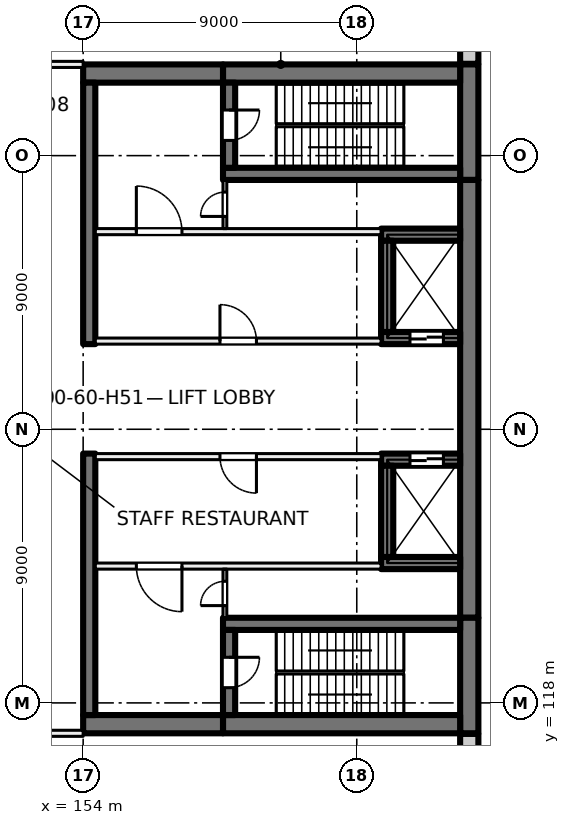
"""IFC4 building model, lengths in metres.
Left out: names, types, materials, properties, quantities, classifications, styles, units other than length and angle.
Written with IfcOpenShell. Run it as: python <this file> out.ifc"""

import sys

from ifc_helpers import new_model, si_unit, direction, frame, frame_2d, origin, place, context, subcontext, project, spatial, rectangle, extrude, element, fill, save


model = new_model("IFC4")
c1 = context("Model", 3, precision=1e-05, world=origin(), true_north=direction((0.0, 1.0)))
c2 = subcontext(c1, "Body", "Model", "MODEL_VIEW")
j1 = project(units=[si_unit("LENGTHUNIT", "METRE"), si_unit("PLANEANGLEUNIT", "RADIAN")], contexts=[c1])
p1 = place(None, origin())
s1 = spatial("IfcSite", under=j1, at=p1, CompositionType="ELEMENT")
p2 = place(p1, origin())
s2 = spatial("IfcBuilding", under=s1, at=p2, CompositionType="ELEMENT")
p3 = place(p2, frame((0.0, 0.0, 75.5)))
s3 = spatial("IfcBuildingStorey", under=s2, at=p3, CompositionType="ELEMENT", Elevation=75.5)
p4 = place(p3, frame((166.7, 139.0, 0.0), z_axis=(0.0, 0.0, 1.0), x_axis=(0.0, -1.0, 0.0)))
e1 = element("IfcWall", 1, at=p4, inside=s3, PredefinedType="SHEAR", context=c2, shape_type="SweptSolid", body=[
    extrude(rectangle(XDim=3.8, YDim=0.6, at=frame_2d((1.9, 0.0))), origin(), (0.0, 0.0, 1.0), 5.5),
])
p5 = place(p3, frame((166.7, 135.2, 0.0), z_axis=(0.0, 0.0, 1.0), x_axis=(0.0, -1.0, 0.0)))
e2 = element("IfcWall", 2, at=p5, inside=s3, PredefinedType="SHEAR", context=c2, shape_type="SweptSolid", body=[
    extrude(rectangle(XDim=14.4, YDim=0.6, at=frame_2d((7.2, 0.0))), origin(), (0.0, 0.0, 1.0), 5.5),
])
p6 = place(p3, frame((166.7, 120.8, 0.0), z_axis=(0.0, 0.0, 1.0), x_axis=(0.0, -1.0, 0.0)))
e3 = element("IfcWall", 3, at=p6, inside=s3, PredefinedType="SHEAR", context=c2, shape_type="SweptSolid", body=[
    extrude(rectangle(XDim=3.8, YDim=0.6, at=frame_2d((1.9, 0.0))), origin(), (0.0, 0.0, 1.0), 5.5),
])
for number, where, z_axis, x_axis in (
    (4, (166.4, 138.7, 0.0), (0.0, 0.0, 1.0), (-1.0, 0.0, 0.0)),
    (5, (166.4, 117.3, 0.0), (0.0, 0.0, 1.0), (-1.0, 0.0, 0.0)),
):
    element("IfcWall", number, at=place(p3, frame(where, z_axis=z_axis, x_axis=x_axis)), inside=s3, PredefinedType="SHEAR", context=c2, shape_type="SweptSolid", body=[
        extrude(rectangle(XDim=7.8, YDim=0.6, at=frame_2d((3.9, 0.0))), origin(), (0.0, 0.0, 1.0), 5.5),
    ])
for number, where, z_axis, x_axis in (
    (6, (158.6, 138.7, 0.0), (0.0, 0.0, 1.0), (-1.0, 0.0, 0.0)),
    (7, (158.6, 117.3, 0.0), (0.0, 0.0, 1.0), (-1.0, 0.0, 0.0)),
):
    element("IfcWall", number, at=place(p3, frame(where, z_axis=z_axis, x_axis=x_axis)), inside=s3, PredefinedType="SHEAR", context=c2, shape_type="SweptSolid", body=[
        extrude(rectangle(XDim=4.6, YDim=0.6, at=frame_2d((2.3, 0.0))), origin(), (0.0, 0.0, 1.0), 5.5),
    ])
p7 = place(p3, frame((166.4, 135.4, 0.0), z_axis=(0.0, 0.0, 1.0), x_axis=(-1.0, 0.0, 0.0)))
e8 = element("IfcWall", 8, at=p7, inside=s3, PredefinedType="SHEAR", context=c2, shape_type="SweptSolid", body=[
    extrude(rectangle(XDim=7.8, YDim=0.4, at=frame_2d((3.9, 0.0))), origin(), (0.0, 0.0, 1.0), 5.5),
])
p8 = place(p3, frame((158.8, 138.4, 0.0), z_axis=(0.0, 0.0, 1.0), x_axis=(0.0, -1.0, 0.0)))
e9 = element("IfcWall", 9, at=p8, inside=s3, PredefinedType="SHEAR", context=c2, shape_type="SweptSolid", body=[
    extrude(rectangle(XDim=2.8, YDim=0.4, at=frame_2d((1.4, 0.0))), origin(), (0.0, 0.0, 1.0), 5.5),
])
p9 = place(p8, frame((0.9, 0.0, 0.0)))
e10 = element("IfcOpeningElement", 10, at=p9, cuts=e9, PredefinedType="OPENING", context=c2, shape_type="SweptSolid", body=[
    extrude(rectangle(XDim=1.0, YDim=2.1, at=frame_2d((0.5, 1.05))), frame((0.0, 0.21, 0.0), z_axis=(0.0, -1.0, 0.0), x_axis=(1.0, 0.0, 0.0)), (0.0, 0.0, 1.0), 0.42),
])
p10 = place(p3, frame((166.4, 120.6, 0.0), z_axis=(0.0, 0.0, 1.0), x_axis=(-1.0, 0.0, 0.0)))
e11 = element("IfcWall", 11, at=p10, inside=s3, PredefinedType="SHEAR", context=c2, shape_type="SweptSolid", body=[
    extrude(rectangle(XDim=7.8, YDim=0.4, at=frame_2d((3.9, 0.0))), origin(), (0.0, 0.0, 1.0), 5.5),
])
p11 = place(p3, frame((158.8, 120.4, 0.0), z_axis=(0.0, 0.0, 1.0), x_axis=(0.0, -1.0, 0.0)))
e12 = element("IfcWall", 12, at=p11, inside=s3, PredefinedType="SHEAR", context=c2, shape_type="SweptSolid", body=[
    extrude(rectangle(XDim=2.8, YDim=0.4, at=frame_2d((1.4, 0.0))), origin(), (0.0, 0.0, 1.0), 5.5),
])
p12 = place(p11, frame((0.9, 0.0, 0.0)))
e13 = element("IfcOpeningElement", 13, at=p12, cuts=e12, PredefinedType="OPENING", context=c2, shape_type="SweptSolid", body=[
    extrude(rectangle(XDim=1.0, YDim=2.1, at=frame_2d((0.5, 1.05))), frame((0.0, 0.21, 0.0), z_axis=(0.0, -1.0, 0.0), x_axis=(1.0, 0.0, 0.0)), (0.0, 0.0, 1.0), 0.42),
])
p13 = place(p3, frame((166.4, 130.0, 0.0), z_axis=(0.0, 0.0, 1.0), x_axis=(-1.0, 0.0, 0.0)))
e14 = element("IfcWall", 14, at=p13, inside=s3, PredefinedType="SHEAR", context=c2, shape_type="SweptSolid", body=[
    extrude(rectangle(XDim=2.6, YDim=0.4, at=frame_2d((1.3, 0.0))), origin(), (0.0, 0.0, 1.0), 5.5),
])
p14 = place(p13, frame((0.55, 0.0, 0.0)))
e15 = element("IfcOpeningElement", 15, at=p14, cuts=e14, PredefinedType="OPENING", context=c2, shape_type="SweptSolid", body=[
    extrude(rectangle(XDim=1.1, YDim=2.1, at=frame_2d((0.55, 1.05))), frame((0.0, 0.21, 0.0), z_axis=(0.0, -1.0, 0.0), x_axis=(1.0, 0.0, 0.0)), (0.0, 0.0, 1.0), 0.42),
])
p15 = place(p3, frame((166.4, 133.4, 0.0), z_axis=(0.0, 0.0, 1.0), x_axis=(-1.0, 0.0, 0.0)))
e16 = element("IfcWall", 16, at=p15, inside=s3, PredefinedType="SHEAR", context=c2, shape_type="SweptSolid", body=[
    extrude(rectangle(XDim=2.6, YDim=0.4, at=frame_2d((1.3, 0.0))), origin(), (0.0, 0.0, 1.0), 5.5),
])
p16 = place(p3, frame((164.0, 133.2, 0.0), z_axis=(0.0, 0.0, 1.0), x_axis=(0.0, -1.0, 0.0)))
e17 = element("IfcWall", 17, at=p16, inside=s3, PredefinedType="SHEAR", context=c2, shape_type="SweptSolid", body=[
    extrude(rectangle(XDim=3.0, YDim=0.4, at=frame_2d((1.5, 0.0))), origin(), (0.0, 0.0, 1.0), 5.5),
])
p17 = place(p3, frame((166.4, 126.0, 0.0), z_axis=(0.0, 0.0, 1.0), x_axis=(-1.0, 0.0, 0.0)))
e18 = element("IfcWall", 18, at=p17, inside=s3, PredefinedType="SHEAR", context=c2, shape_type="SweptSolid", body=[
    extrude(rectangle(XDim=2.6, YDim=0.4, at=frame_2d((1.3, 0.0))), origin(), (0.0, 0.0, 1.0), 5.5),
])
p18 = place(p17, frame((0.55, 0.0, 0.0)))
e19 = element("IfcOpeningElement", 19, at=p18, cuts=e18, PredefinedType="OPENING", context=c2, shape_type="SweptSolid", body=[
    extrude(rectangle(XDim=1.1, YDim=2.1, at=frame_2d((0.55, 1.05))), frame((0.0, 0.21, 0.0), z_axis=(0.0, -1.0, 0.0), x_axis=(1.0, 0.0, 0.0)), (0.0, 0.0, 1.0), 0.42),
])
p19 = place(p3, frame((166.4, 122.6, 0.0), z_axis=(0.0, 0.0, 1.0), x_axis=(-1.0, 0.0, 0.0)))
e20 = element("IfcWall", 20, at=p19, inside=s3, PredefinedType="SHEAR", context=c2, shape_type="SweptSolid", body=[
    extrude(rectangle(XDim=2.6, YDim=0.4, at=frame_2d((1.3, 0.0))), origin(), (0.0, 0.0, 1.0), 5.5),
])
p20 = place(p3, frame((164.0, 125.8, 0.0), z_axis=(0.0, 0.0, 1.0), x_axis=(0.0, -1.0, 0.0)))
e21 = element("IfcWall", 21, at=p20, inside=s3, PredefinedType="SHEAR", context=c2, shape_type="SweptSolid", body=[
    extrude(rectangle(XDim=3.0, YDim=0.4, at=frame_2d((1.5, 0.0))), origin(), (0.0, 0.0, 1.0), 5.5),
])
for number, where, z_axis, x_axis in (
    (22, (154.2, 138.4, 0.0), (0.0, 0.0, 1.0), (0.0, -1.0, 0.0)),
    (23, (154.2, 126.2, 0.0), (0.0, 0.0, 1.0), (0.0, -1.0, 0.0)),
):
    element("IfcWall", number, at=place(p3, frame(where, z_axis=z_axis, x_axis=x_axis)), inside=s3, PredefinedType="SHEAR", context=c2, shape_type="SweptSolid", body=[
        extrude(rectangle(XDim=8.6, YDim=0.4, at=frame_2d((4.3, 0.0))), origin(), (0.0, 0.0, 1.0), 5.5),
    ])
p21 = place(p3, frame((166.7, 116.98, 0.0), z_axis=(0.0, 0.0, 1.0), x_axis=(0.0, -1.0, 0.0)))
e24 = element("IfcWall", 24, at=p21, inside=s3, PredefinedType="SOLIDWALL", context=c2, shape_type="SweptSolid", body=[
    extrude(rectangle(XDim=2.98, YDim=0.6, at=frame_2d((1.49, 0.0))), origin(), (0.0, 0.0, 1.0), 5.125),
])
p22 = place(p3, frame((166.7, 141.93, 0.0), z_axis=(0.0, 0.0, 1.0), x_axis=(0.0, -1.0, 0.0)))
e25 = element("IfcWall", 25, at=p22, inside=s3, PredefinedType="SOLIDWALL", context=c2, shape_type="SweptSolid", body=[
    extrude(rectangle(XDim=2.91, YDim=0.6, at=frame_2d((1.455, 0.0))), origin(), (0.0, 0.0, 1.0), 5.125),
])
p23 = place(p3, frame((163.8, 126.1, 0.0), z_axis=(0.0, 0.0, 1.0), x_axis=(-1.0, 0.0, 0.0)))
e26 = element("IfcWall", 26, at=p23, inside=s3, PredefinedType="PARTITIONING", context=c2, shape_type="SweptSolid", body=[
    extrude(rectangle(XDim=9.4, YDim=0.2, at=frame_2d((4.7, 0.0))), origin(), (0.0, 0.0, 1.0), 5.125),
])
p24 = place(p23, frame((4.1, 0.0, 0.0)))
e27 = element("IfcOpeningElement", 27, at=p24, cuts=e26, PredefinedType="OPENING", context=c2, shape_type="SweptSolid", body=[
    extrude(rectangle(XDim=1.2, YDim=2.1, at=frame_2d((0.6, 1.05))), frame((0.0, 0.11, 0.0), z_axis=(0.0, -1.0, 0.0), x_axis=(1.0, 0.0, 0.0)), (0.0, 0.0, 1.0), 0.22),
])
p25 = place(p3, frame((163.8, 122.5, 0.0), z_axis=(0.0, 0.0, 1.0), x_axis=(-1.0, 0.0, 0.0)))
e28 = element("IfcWall", 28, at=p25, inside=s3, PredefinedType="PARTITIONING", context=c2, shape_type="SweptSolid", body=[
    extrude(rectangle(XDim=9.4, YDim=0.2, at=frame_2d((4.7, 0.0))), origin(), (0.0, 0.0, 1.0), 5.125),
])
p26 = place(p25, frame((6.55, 0.0, 0.0)))
e29 = element("IfcOpeningElement", 29, at=p26, cuts=e28, PredefinedType="OPENING", context=c2, shape_type="SweptSolid", body=[
    extrude(rectangle(XDim=1.5, YDim=2.1, at=frame_2d((0.75, 1.05))), frame((0.0, 0.11, 0.0), z_axis=(0.0, -1.0, 0.0), x_axis=(1.0, 0.0, 0.0)), (0.0, 0.0, 1.0), 0.22),
])
p27 = place(p3, frame((158.663, 120.8, 0.0), z_axis=(0.0, 0.0, 1.0), x_axis=(0.0, 1.0, 0.0)))
e30 = element("IfcWall", 30, at=p27, inside=s3, PredefinedType="PARTITIONING", context=c2, shape_type="SweptSolid", body=[
    extrude(rectangle(XDim=1.6, YDim=0.125, at=frame_2d((0.8, 0.0))), origin(), (0.0, 0.0, 1.0), 5.125),
])
p28 = place(p27, frame((0.4, 0.0, 0.0)))
e31 = element("IfcOpeningElement", 31, at=p28, cuts=e30, PredefinedType="OPENING", context=c2, shape_type="SweptSolid", body=[
    extrude(rectangle(XDim=0.8, YDim=2.1, at=frame_2d((0.4, 1.05))), frame((0.0, 0.073, 0.0), z_axis=(0.0, -1.0, 0.0), x_axis=(1.0, 0.0, 0.0)), (0.0, 0.0, 1.0), 0.145),
])
p29 = place(p3, frame((154.4, 129.9, 0.0), z_axis=(0.0, 0.0, 1.0), x_axis=(1.0, 0.0, 0.0)))
e32 = element("IfcWall", 32, at=p29, inside=s3, PredefinedType="PARTITIONING", context=c2, shape_type="SweptSolid", body=[
    extrude(rectangle(XDim=9.4, YDim=0.2, at=frame_2d((4.7, 0.0))), origin(), (0.0, 0.0, 1.0), 5.125),
])
p30 = place(p29, frame((4.1, 0.0, 0.0)))
e33 = element("IfcOpeningElement", 33, at=p30, cuts=e32, PredefinedType="OPENING", context=c2, shape_type="SweptSolid", body=[
    extrude(rectangle(XDim=1.2, YDim=2.1, at=frame_2d((0.6, 1.05))), frame((0.0, 0.11, 0.0), z_axis=(0.0, -1.0, 0.0), x_axis=(1.0, 0.0, 0.0)), (0.0, 0.0, 1.0), 0.22),
])
p31 = place(p3, frame((154.4, 133.5, 0.0), z_axis=(0.0, 0.0, 1.0), x_axis=(1.0, 0.0, 0.0)))
e34 = element("IfcWall", 34, at=p31, inside=s3, PredefinedType="PARTITIONING", context=c2, shape_type="SweptSolid", body=[
    extrude(rectangle(XDim=9.4, YDim=0.2, at=frame_2d((4.7, 0.0))), origin(), (0.0, 0.0, 1.0), 5.125),
])
p32 = place(p31, frame((1.35, 0.0, 0.0)))
e35 = element("IfcOpeningElement", 35, at=p32, cuts=e34, PredefinedType="OPENING", context=c2, shape_type="SweptSolid", body=[
    extrude(rectangle(XDim=1.5, YDim=2.1, at=frame_2d((0.75, 1.05))), frame((0.0, 0.11, 0.0), z_axis=(0.0, -1.0, 0.0), x_axis=(1.0, 0.0, 0.0)), (0.0, 0.0, 1.0), 0.22),
])
p33 = place(p3, frame((158.663, 133.6, 0.0), z_axis=(0.0, 0.0, 1.0), x_axis=(0.0, 1.0, 0.0)))
e36 = element("IfcWall", 36, at=p33, inside=s3, PredefinedType="PARTITIONING", context=c2, shape_type="SweptSolid", body=[
    extrude(rectangle(XDim=1.6, YDim=0.125, at=frame_2d((0.8, 0.0))), origin(), (0.0, 0.0, 1.0), 5.125),
])
p34 = place(p33, frame((0.4, 0.0, 0.0)))
e37 = element("IfcOpeningElement", 37, at=p34, cuts=e36, PredefinedType="OPENING", context=c2, shape_type="SweptSolid", body=[
    extrude(rectangle(XDim=0.8, YDim=2.1, at=frame_2d((0.4, 1.05))), frame((0.0, 0.073, 0.0), z_axis=(0.0, -1.0, 0.0), x_axis=(1.0, 0.0, 0.0)), (0.0, 0.0, 1.0), 0.145),
])
p35 = place(p3, frame((154.0, 117.0, 0.0), z_axis=(0.0, 0.0, 1.0), x_axis=(-1.0, 0.0, 0.0)))
e38 = element("IfcWall", 38, at=p35, inside=s3, PredefinedType="PARTITIONING", context=c2, shape_type="SweptSolid", body=[
    extrude(rectangle(XDim=14.0, YDim=0.2, at=frame_2d((7.0, 0.0))), origin(), (0.0, 0.0, 1.0), 5.125),
])
p36 = place(p35, frame((11.1, 0.0, 0.0)))
e39 = element("IfcOpeningElement", 39, at=p36, cuts=e38, PredefinedType="OPENING", context=c2, shape_type="SweptSolid", body=[
    extrude(rectangle(XDim=1.8, YDim=2.1, at=frame_2d((0.9, 1.05))), frame((0.0, 0.11, 0.0), z_axis=(0.0, -1.0, 0.0), x_axis=(1.0, 0.0, 0.0)), (0.0, 0.0, 1.0), 0.22),
])
p37 = place(p35, frame((1.1, 0.0, 0.0)))
e40 = element("IfcOpeningElement", 40, at=p37, cuts=e38, PredefinedType="OPENING", context=c2, shape_type="SweptSolid", body=[
    extrude(rectangle(XDim=1.8, YDim=2.1, at=frame_2d((0.9, 1.05))), frame((0.0, 0.11, 0.0), z_axis=(0.0, -1.0, 0.0), x_axis=(1.0, 0.0, 0.0)), (0.0, 0.0, 1.0), 0.22),
])
p38 = place(p3, frame((150.0, 139.0, 0.0), z_axis=(0.0, 0.0, 1.0), x_axis=(1.0, 0.0, 0.0)))
e41 = element("IfcWall", 41, at=p38, inside=s3, PredefinedType="PARTITIONING", context=c2, shape_type="SweptSolid", body=[
    extrude(rectangle(XDim=4.0, YDim=0.2, at=frame_2d((2.0, 0.0))), origin(), (0.0, 0.0, 1.0), 5.125),
])
p39 = place(p38, frame((1.1, 0.0, 0.0)))
e42 = element("IfcOpeningElement", 42, at=p39, cuts=e41, PredefinedType="OPENING", context=c2, shape_type="SweptSolid", body=[
    extrude(rectangle(XDim=1.8, YDim=2.1, at=frame_2d((0.9, 1.05))), frame((0.0, 0.11, 0.0), z_axis=(0.0, -1.0, 0.0), x_axis=(1.0, 0.0, 0.0)), (0.0, 0.0, 1.0), 0.22),
])
p40 = place(p18, origin())
e43 = element("IfcDoor", 43, at=p40, inside=s3, OperationType="DOUBLE_DOOR_SLIDING", PredefinedType="DOOR", context=c2, shape_type="SweptSolid", body=[
    extrude(rectangle(XDim=1.1, YDim=2.1, at=frame_2d((0.55, 1.05))), frame((0.0, 0.025, 0.0), z_axis=(0.0, -1.0, 0.0), x_axis=(1.0, 0.0, 0.0)), (0.0, 0.0, 1.0), 0.05),
])
fill(e19, e43)
p41 = place(p14, origin())
e44 = element("IfcDoor", 44, at=p41, inside=s3, OperationType="DOUBLE_DOOR_SLIDING", PredefinedType="DOOR", context=c2, shape_type="SweptSolid", body=[
    extrude(rectangle(XDim=1.1, YDim=2.1, at=frame_2d((0.55, 1.05))), frame((0.0, 0.025, 0.0), z_axis=(0.0, -1.0, 0.0), x_axis=(1.0, 0.0, 0.0)), (0.0, 0.0, 1.0), 0.05),
])
fill(e15, e44)
p42 = place(p24, origin())
e45 = element("IfcDoor", 45, at=p42, inside=s3, OperationType="DOUBLE_DOOR_SINGLE_SWING", PredefinedType="DOOR", context=c2, shape_type="SweptSolid", body=[
    extrude(rectangle(XDim=1.2, YDim=2.1, at=frame_2d((0.6, 1.05))), frame((0.0, 0.025, 0.0), z_axis=(0.0, -1.0, 0.0), x_axis=(1.0, 0.0, 0.0)), (0.0, 0.0, 1.0), 0.05),
])
fill(e27, e45)
p43 = place(p26, origin())
e46 = element("IfcDoor", 46, at=p43, inside=s3, OperationType="DOUBLE_DOOR_SINGLE_SWING", PredefinedType="DOOR", context=c2, shape_type="SweptSolid", body=[
    extrude(rectangle(XDim=1.5, YDim=2.1, at=frame_2d((0.75, 1.05))), frame((0.0, 0.025, 0.0), z_axis=(0.0, -1.0, 0.0), x_axis=(1.0, 0.0, 0.0)), (0.0, 0.0, 1.0), 0.05),
])
fill(e29, e46)
p44 = place(p12, origin())
e47 = element("IfcDoor", 47, at=p44, inside=s3, OperationType="SINGLE_SWING_LEFT", PredefinedType="DOOR", context=c2, shape_type="SweptSolid", body=[
    extrude(rectangle(XDim=1.0, YDim=2.1, at=frame_2d((0.5, 1.05))), frame((0.0, 0.025, 0.0), z_axis=(0.0, -1.0, 0.0), x_axis=(1.0, 0.0, 0.0)), (0.0, 0.0, 1.0), 0.05),
])
fill(e13, e47)
p45 = place(p28, origin())
e48 = element("IfcDoor", 48, at=p45, inside=s3, OperationType="SINGLE_SWING_RIGHT", PredefinedType="DOOR", context=c2, shape_type="SweptSolid", body=[
    extrude(rectangle(XDim=0.8, YDim=2.1, at=frame_2d((0.4, 1.05))), frame((0.0, 0.025, 0.0), z_axis=(0.0, -1.0, 0.0), x_axis=(1.0, 0.0, 0.0)), (0.0, 0.0, 1.0), 0.05),
])
fill(e31, e48)
p46 = place(p30, origin())
e49 = element("IfcDoor", 49, at=p46, inside=s3, OperationType="DOUBLE_DOOR_SINGLE_SWING", PredefinedType="DOOR", context=c2, shape_type="SweptSolid", body=[
    extrude(rectangle(XDim=1.2, YDim=2.1, at=frame_2d((0.6, 1.05))), frame((0.0, 0.025, 0.0), z_axis=(0.0, -1.0, 0.0), x_axis=(1.0, 0.0, 0.0)), (0.0, 0.0, 1.0), 0.05),
])
fill(e33, e49)
p47 = place(p32, origin())
e50 = element("IfcDoor", 50, at=p47, inside=s3, OperationType="DOUBLE_DOOR_SINGLE_SWING", PredefinedType="DOOR", context=c2, shape_type="SweptSolid", body=[
    extrude(rectangle(XDim=1.5, YDim=2.1, at=frame_2d((0.75, 1.05))), frame((0.0, 0.025, 0.0), z_axis=(0.0, -1.0, 0.0), x_axis=(1.0, 0.0, 0.0)), (0.0, 0.0, 1.0), 0.05),
])
fill(e35, e50)
p48 = place(p9, origin())
e51 = element("IfcDoor", 51, at=p48, inside=s3, OperationType="SINGLE_SWING_RIGHT", PredefinedType="DOOR", context=c2, shape_type="SweptSolid", body=[
    extrude(rectangle(XDim=1.0, YDim=2.1, at=frame_2d((0.5, 1.05))), frame((0.0, 0.025, 0.0), z_axis=(0.0, -1.0, 0.0), x_axis=(1.0, 0.0, 0.0)), (0.0, 0.0, 1.0), 0.05),
])
fill(e10, e51)
p49 = place(p34, origin())
e52 = element("IfcDoor", 52, at=p49, inside=s3, OperationType="SINGLE_SWING_LEFT", PredefinedType="DOOR", context=c2, shape_type="SweptSolid", body=[
    extrude(rectangle(XDim=0.8, YDim=2.1, at=frame_2d((0.4, 1.05))), frame((0.0, 0.025, 0.0), z_axis=(0.0, -1.0, 0.0), x_axis=(1.0, 0.0, 0.0)), (0.0, 0.0, 1.0), 0.05),
])
fill(e37, e52)
save(model, sys.argv[1])
